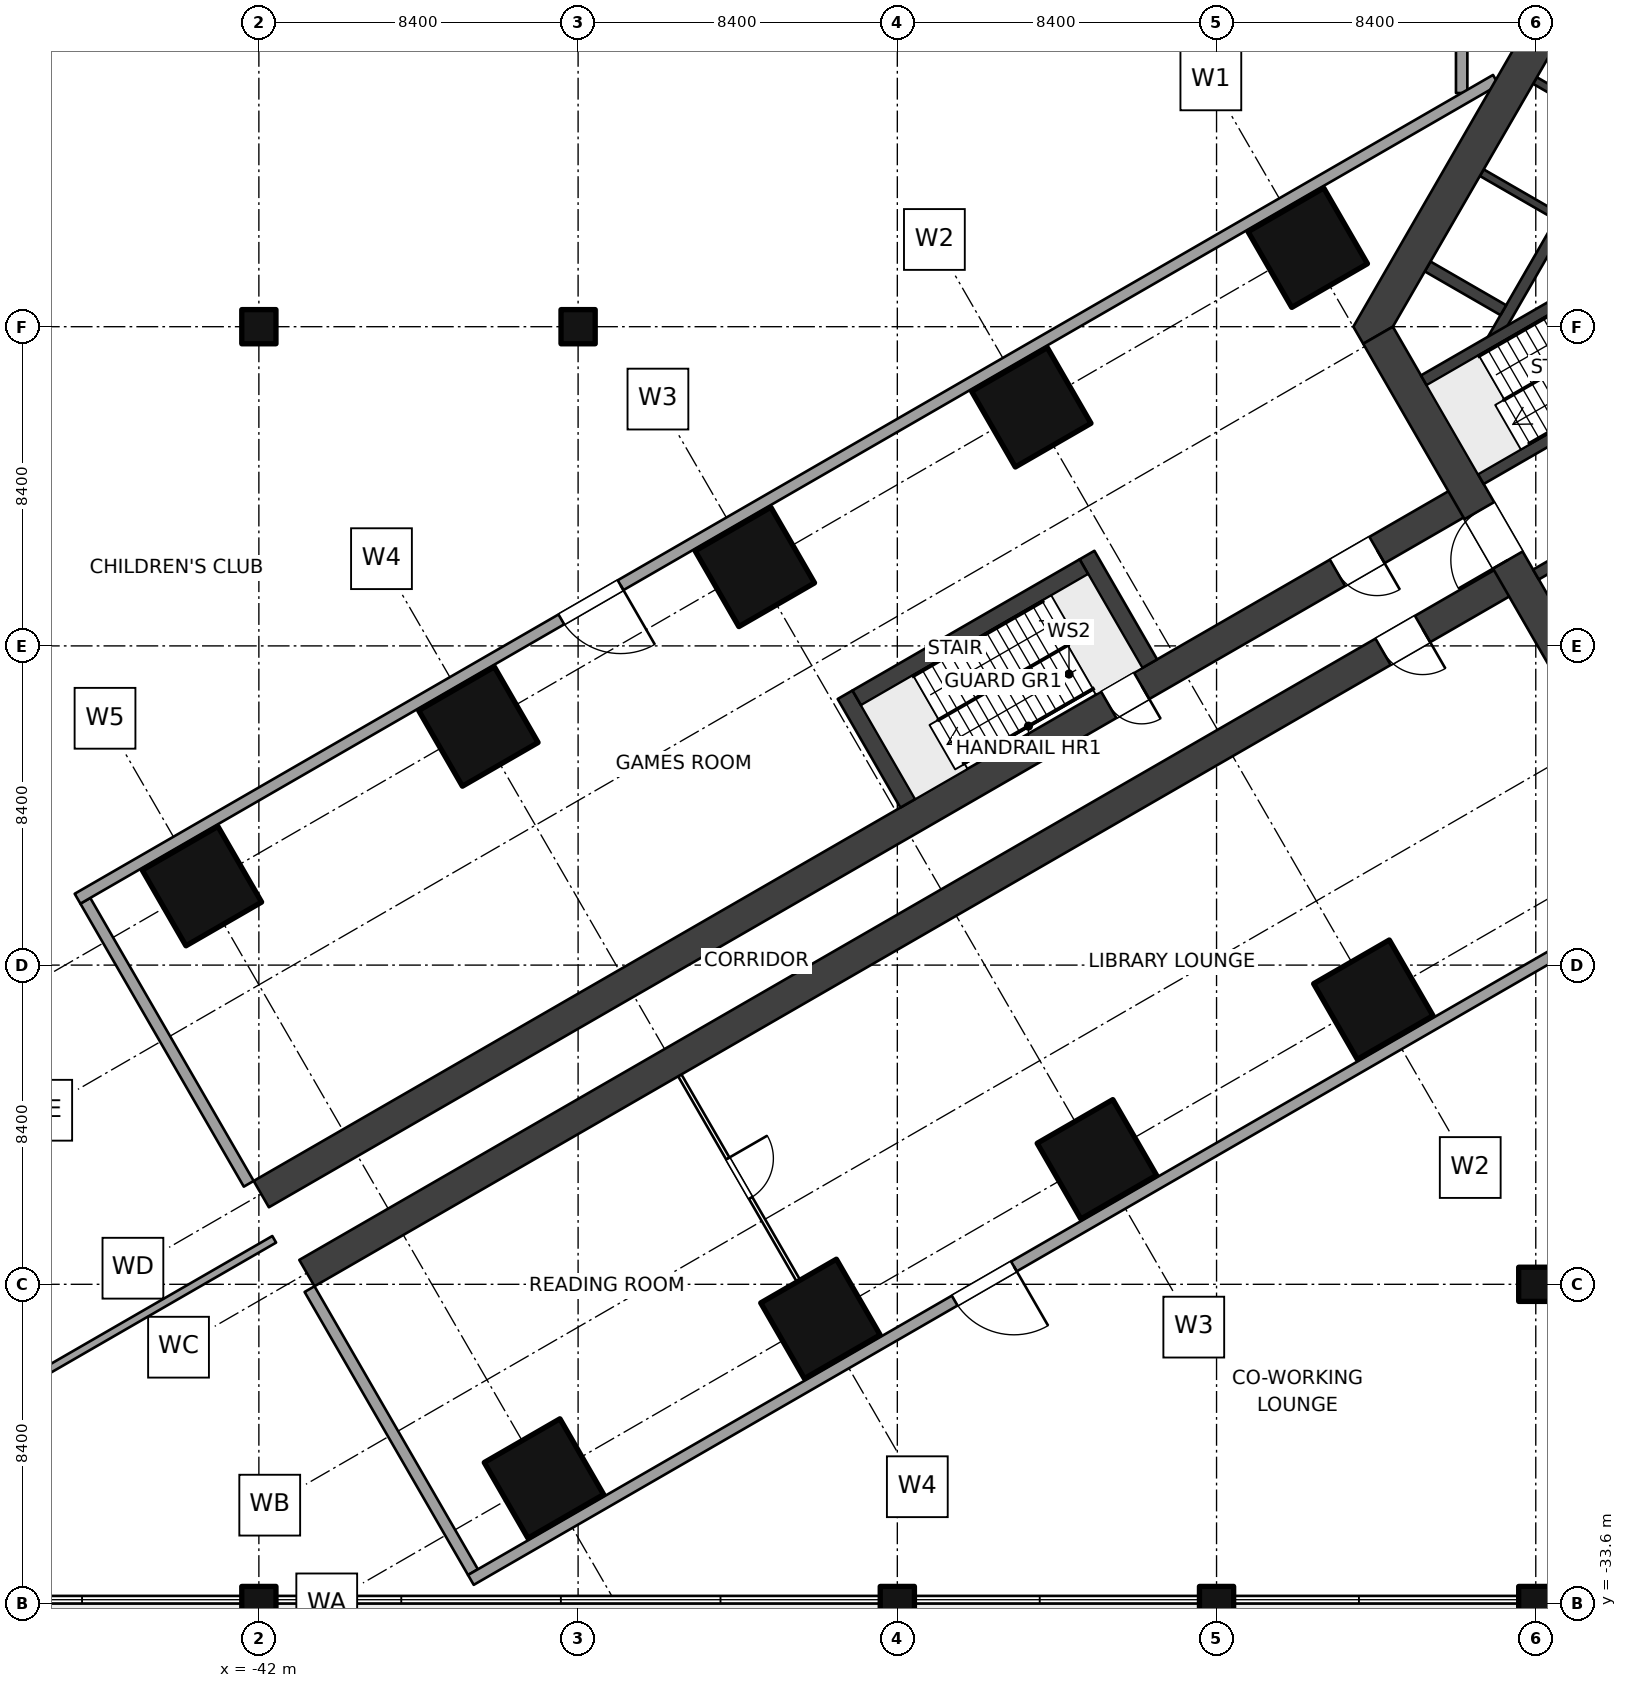
"""IFC4 building model, lengths in metres.
Left out: names, types, materials, properties, quantities, classifications, styles, units other than length and angle.
Written with IfcOpenShell. Run it as: python <this file> out.ifc"""

import sys

from ifc_helpers import new_model, si_unit, direction, frame, frame_2d, origin, origin_2d, place, context, subcontext, project, spatial, polyline, rectangle, outline, extrude, element, fill, save


model = new_model("IFC4")
c1 = context("Model", 3, precision=1e-05, world=origin(), true_north=direction((0.0, 1.0)))
c2 = subcontext(c1, "Body", "Model", "MODEL_VIEW")
j1 = project(units=[si_unit("LENGTHUNIT", "METRE"), si_unit("PLANEANGLEUNIT", "RADIAN")], contexts=[c1])
p1 = place(None, origin())
s1 = spatial("IfcSite", under=j1, at=p1, CompositionType="ELEMENT")
p2 = place(p1, origin())
s2 = spatial("IfcBuilding", under=s1, at=p2, CompositionType="ELEMENT")
p3 = place(p2, frame((0.0, 0.0, 6.0)))
s3 = spatial("IfcBuildingStorey", under=s2, at=p3, CompositionType="ELEMENT", Elevation=6.0)
for number, where, z_axis, x_axis in (
    (1, (-14.4, 2.078, 0.0), (0.0, 0.0, 1.0), (-0.5, 0.866, 0.0)),
    (2, (-12.675, -17.71, 0.0), (0.0, 0.0, 1.0), (-0.5, 0.866, 0.0)),
    (3, (-21.675, -2.122, 0.0), (0.0, 0.0, 1.0), (-0.5, 0.866, 0.0)),
    (4, (-19.949, -21.91, 0.0), (0.0, 0.0, 1.0), (-0.5, 0.866, 0.0)),
    (5, (-28.949, -6.322, 0.0), (0.0, 0.0, 1.0), (-0.5, 0.866, 0.0)),
    (6, (-27.224, -26.11, 0.0), (0.0, 0.0, 1.0), (-0.5, 0.866, 0.0)),
    (7, (-36.224, -10.521, 0.0), (0.0, 0.0, 1.0), (-0.5, 0.866, 0.0)),
    (8, (-34.499, -30.31, 0.0), (0.0, 0.0, 1.0), (-0.5, 0.866, 0.0)),
    (9, (-43.499, -14.721, 0.0), (0.0, 0.0, 1.0), (-0.5, 0.866, 0.0)),
):
    element("IfcColumn", number, at=place(p3, frame(where, z_axis=z_axis, x_axis=x_axis)), inside=s3, PredefinedType="COLUMN", context=c2, shape_type="SweptSolid", body=[
        extrude(rectangle(XDim=2.3, YDim=2.3, at=origin_2d()), origin(), (0.0, 0.0, 1.0), 5.0),
    ])
for number, where, z_axis, x_axis in (
    (10, (-42.0, -33.6, 0.0), (0.0, 0.0, 1.0), (1.0, 0.0, 0.0)),
    (11, (-42.0, 0.0, 0.0), (0.0, 0.0, 1.0), (1.0, 0.0, 0.0)),
    (12, (-33.6, 0.0, 0.0), (0.0, 0.0, 1.0), (1.0, 0.0, 0.0)),
    (13, (-25.2, -33.6, 0.0), (0.0, 0.0, 1.0), (1.0, 0.0, 0.0)),
    (14, (-16.8, -33.6, 0.0), (0.0, 0.0, 1.0), (1.0, 0.0, 0.0)),
    (15, (-8.4, -33.6, 0.0), (0.0, 0.0, 1.0), (1.0, 0.0, 0.0)),
    (16, (-8.4, -25.2, 0.0), (0.0, 0.0, 1.0), (1.0, 0.0, 0.0)),
):
    element("IfcColumn", number, at=place(p3, frame(where, z_axis=z_axis, x_axis=x_axis)), inside=s3, PredefinedType="COLUMN", context=c2, shape_type="SweptSolid", body=[
        extrude(rectangle(XDim=0.9, YDim=0.9, at=origin_2d()), origin(), (0.0, 0.0, 1.0), 5.0),
    ])
p4 = place(p3, frame((-6.47, -10.757, 0.0), z_axis=(0.0, 0.0, 1.0), x_axis=(-0.499997612506, 0.8660267822, 0.0)))
e17 = element("IfcWall", 17, at=p4, inside=s3, PredefinedType="SHEAR", context=c2, shape_type="SweptSolid", body=[
    extrude(rectangle(XDim=12.161, YDim=0.9, at=frame_2d((6.08, 0.0))), origin(), (0.0, 0.0, 1.0), 5.0),
])
p5 = place(p4, frame((5.33, 0.0, 0.0)))
e18 = element("IfcOpeningElement", 18, at=p5, cuts=e17, PredefinedType="OPENING", context=c2, shape_type="SweptSolid", body=[
    extrude(rectangle(XDim=1.5, YDim=2.1, at=frame_2d((0.75, 1.05))), frame((0.0, 0.46, 0.0), z_axis=(0.0, -1.0, 0.0), x_axis=(1.0, 0.0, 0.0)), (0.0, 0.0, 1.0), 0.92),
])
p6 = place(p3, origin())
e19 = element("IfcWall", 19, at=p6, inside=s3, PredefinedType="SHEAR", context=c2, shape_type="SweptSolid", body=[
    extrude(outline(polyline([(-6.6, 11.432), (-13.2, 0.0), (-12.94, -0.45), (-12.161, 0.0), (-6.08, 10.531), (-6.08, 11.432), (-6.6, 11.432)])), origin(), (0.0, 0.0, 1.0), 5.0),
])
p7 = place(p3, frame((-3.869, -0.559, 0.0), z_axis=(0.0, 0.0, 1.0), x_axis=(-0.86602711848, -0.499997030048, 0.0)))
e20 = element("IfcWall", 20, at=p7, inside=s3, PredefinedType="SHEAR", context=c2, shape_type="SweptSolid", body=[
    extrude(rectangle(XDim=6.901, YDim=0.3, at=frame_2d((3.451, 0.0))), origin(), (0.0, 0.0, 1.0), 5.0),
])
p8 = place(p7, frame((0.25, 0.0, 0.0)))
e21 = element("IfcOpeningElement", 21, at=p8, cuts=e20, PredefinedType="OPENING", context=c2, shape_type="SweptSolid", body=[
    extrude(rectangle(XDim=1.0, YDim=2.1, at=frame_2d((0.5, 1.05))), frame((0.0, 0.16, 0.0), z_axis=(0.0, -1.0, 0.0), x_axis=(1.0, 0.0, 0.0)), (0.0, 0.0, 1.0), 0.32),
])
p9 = place(p3, frame((-5.369, 2.039, 0.0), z_axis=(0.0, 0.0, 1.0), x_axis=(-0.86602711848, -0.499997030048, 0.0)))
e22 = element("IfcWall", 22, at=p9, inside=s3, PredefinedType="SHEAR", context=c2, shape_type="SweptSolid", body=[
    extrude(rectangle(XDim=6.901, YDim=0.3, at=frame_2d((3.451, 0.0))), origin(), (0.0, 0.0, 1.0), 5.0),
])
p10 = place(p3, frame((-2.419, -3.071, 0.0), z_axis=(0.0, 0.0, 1.0), x_axis=(-0.86602711848, -0.499997030048, 0.0)))
e23 = element("IfcWall", 23, at=p10, inside=s3, PredefinedType="SHEAR", context=c2, shape_type="SweptSolid", body=[
    extrude(rectangle(XDim=6.901, YDim=0.3, at=frame_2d((3.451, 0.0))), origin(), (0.0, 0.0, 1.0), 5.0),
])
p11 = place(p10, frame((4.85, 0.0, 0.0)))
e24 = element("IfcOpeningElement", 24, at=p11, cuts=e23, PredefinedType="OPENING", context=c2, shape_type="SweptSolid", body=[
    extrude(rectangle(XDim=1.1, YDim=2.1, at=frame_2d((0.55, 1.05))), frame((0.0, 0.16, 0.0), z_axis=(0.0, -1.0, 0.0), x_axis=(1.0, 0.0, 0.0)), (0.0, 0.0, 1.0), 0.32),
])
p12 = place(p3, frame((-9.548, -0.374, 0.0), z_axis=(0.0, 0.0, 1.0), x_axis=(0.500002290144, 0.866024081565, 0.0)))
e25 = element("IfcWall", 25, at=p12, inside=s3, PredefinedType="SHEAR", context=c2, shape_type="SweptSolid", body=[
    extrude(rectangle(XDim=10.195, YDim=0.3, at=frame_2d((5.098, 0.0))), origin(), (0.0, 0.0, 1.0), 5.0),
])
p13 = place(p3, frame((-9.254, 0.435, 0.0), z_axis=(0.0, 0.0, 1.0), x_axis=(-0.866007057882, 0.500031774688, 0.0)))
e26 = element("IfcWall", 26, at=p13, inside=s3, PredefinedType="SHEAR", context=c2, shape_type="SweptSolid", body=[
    extrude(rectangle(XDim=2.3, YDim=0.3, at=frame_2d((1.15, 0.0))), origin(), (0.0, 0.0, 1.0), 5.0),
])
for number, where, z_axis, x_axis in (
    (27, (-7.829, 2.903, 0.0), (0.0, 0.0, 1.0), (-0.866, 0.5, 0.0)),
    (28, (-6.429, 5.328, 0.0), (0.0, 0.0, 1.0), (-0.866, 0.5, 0.0)),
):
    element("IfcWall", number, at=place(p3, frame(where, z_axis=z_axis, x_axis=x_axis)), inside=s3, PredefinedType="SHEAR", context=c2, shape_type="SweptSolid", body=[
        extrude(rectangle(XDim=2.3, YDim=0.2, at=frame_2d((1.15, 0.0))), origin(), (0.0, 0.0, 1.0), 5.0),
    ])
p14 = place(p3, frame((-8.91, -6.53, 0.0), z_axis=(0.0, 0.0, 1.0), x_axis=(-0.866025284237, -0.500000207062, 0.0)))
e29 = element("IfcWall", 29, at=p14, inside=s3, PredefinedType="SHEAR", context=c2, shape_type="SweptSolid", body=[
    extrude(rectangle(XDim=36.75, YDim=0.8, at=frame_2d((18.375, 0.0))), origin(), (0.0, 0.0, 1.0), 5.0),
])
p15 = place(p14, frame((2.85, 0.0, 0.0)))
e30 = element("IfcOpeningElement", 30, at=p15, cuts=e29, PredefinedType="OPENING", context=c2, shape_type="SweptSolid", body=[
    extrude(rectangle(XDim=1.2, YDim=2.1, at=frame_2d((0.6, 1.05))), frame((0.0, 0.41, 0.0), z_axis=(0.0, -1.0, 0.0), x_axis=(1.0, 0.0, 0.0)), (0.0, 0.0, 1.0), 0.82),
])
p16 = place(p3, frame((-10.11, -4.451, 0.0), z_axis=(0.0, 0.0, 1.0), x_axis=(-0.866025284237, -0.500000207062, 0.0)))
e31 = element("IfcWall", 31, at=p16, inside=s3, PredefinedType="SHEAR", context=c2, shape_type="SweptSolid", body=[
    extrude(rectangle(XDim=36.75, YDim=0.8, at=frame_2d((18.375, 0.0))), origin(), (0.0, 0.0, 1.0), 5.0),
])
p17 = place(p16, frame((10.0, 0.0, 0.0)))
e32 = element("IfcOpeningElement", 32, at=p17, cuts=e31, PredefinedType="OPENING", context=c2, shape_type="SweptSolid", body=[
    extrude(rectangle(XDim=1.0, YDim=2.1, at=frame_2d((0.5, 1.05))), frame((0.0, 0.41, 0.0), z_axis=(0.0, -1.0, 0.0), x_axis=(1.0, 0.0, 0.0)), (0.0, 0.0, 1.0), 0.82),
])
p18 = place(p16, frame((2.85, 0.0, 0.0)))
e33 = element("IfcOpeningElement", 33, at=p18, cuts=e31, PredefinedType="OPENING", context=c2, shape_type="SweptSolid", body=[
    extrude(rectangle(XDim=1.2, YDim=2.1, at=frame_2d((0.6, 1.05))), frame((0.0, 0.41, 0.0), z_axis=(0.0, -1.0, 0.0), x_axis=(1.0, 0.0, 0.0)), (0.0, 0.0, 1.0), 0.82),
])
p19 = place(p3, frame((-30.924, -19.701, 0.0), z_axis=(0.0, 0.0, 1.0), x_axis=(0.500004234368, -0.866022959057, 0.0)))
e34 = element("IfcWall", 34, at=p19, inside=s3, PredefinedType="PARTITIONING", context=c2, shape_type="SweptSolid", body=[
    extrude(rectangle(XDim=6.25, YDim=0.1, at=frame_2d((3.125, 0.0))), origin(), (0.0, 0.0, 1.0), 2.9),
])
p20 = place(p19, frame((2.525, 0.0, 0.0)))
e35 = element("IfcOpeningElement", 35, at=p20, cuts=e34, PredefinedType="OPENING", context=c2, shape_type="SweptSolid", body=[
    extrude(rectangle(XDim=1.2, YDim=2.1, at=frame_2d((0.6, 1.05))), frame((0.0, 0.06, 0.0), z_axis=(0.0, -1.0, 0.0), x_axis=(1.0, 0.0, 0.0)), (0.0, 0.0, 1.0), 0.12),
])
p21 = place(p3, frame((-41.596, -24.016, 0.0), z_axis=(0.0, 0.0, 1.0), x_axis=(-0.866027790195, -0.499995866593, 0.0)))
e36 = element("IfcWall", 36, at=p21, inside=s3, PredefinedType="SOLIDWALL", context=c2, shape_type="SweptSolid", body=[
    extrude(rectangle(XDim=9.919, YDim=0.2, at=frame_2d((4.96, 0.0))), origin(), (0.0, 0.0, 1.0), 4.7),
])
for number, where, z_axis, x_axis in (
    (37, (-40.667, -25.326, 0.0), (0.0, 0.0, 1.0), (0.5, -0.866, 0.0)),
    (38, (-42.267, -22.555, 0.0), (0.0, 0.0, 1.0), (-0.5, 0.866, 0.0)),
):
    element("IfcWall", number, at=place(p3, frame(where, z_axis=z_axis, x_axis=x_axis)), inside=s3, PredefinedType="SOLIDWALL", context=c2, shape_type="SweptSolid", body=[
        extrude(rectangle(XDim=8.6, YDim=0.3, at=frame_2d((4.3, 0.0))), origin(), (0.0, 0.0, 1.0), 3.1),
    ])
p22 = place(p3, frame((-10.35, 6.149, 0.0), z_axis=(0.0, 0.0, 1.0), x_axis=(0.0, 1.0, 0.0)))
e39 = element("IfcWall", 39, at=p22, inside=s3, PredefinedType="SOLIDWALL", context=c2, shape_type="SweptSolid", body=[
    extrude(rectangle(XDim=41.883, YDim=0.3, at=frame_2d((20.941, 0.0))), origin(), (0.0, 0.0, 1.0), 4.7),
])
p23 = place(p22, frame((25.383, 0.0, 0.0)))
e40 = element("IfcOpeningElement", 40, at=p23, cuts=e39, PredefinedType="OPENING", context=c2, shape_type="SweptSolid", body=[
    extrude(rectangle(XDim=1.8, YDim=2.4, at=frame_2d((0.9, 1.2))), frame((0.0, 0.16, 0.0), z_axis=(0.0, -1.0, 0.0), x_axis=(1.0, 0.0, 0.0)), (0.0, 0.0, 1.0), 0.32),
])
p24 = place(p3, frame((-0.15, -12.038, 0.0), z_axis=(0.0, 0.0, 1.0), x_axis=(-0.866026292622, -0.499998460486, 0.0)))
e41 = element("IfcWall", 41, at=p24, inside=s3, PredefinedType="SOLIDWALL", context=c2, shape_type="SweptSolid", body=[
    extrude(rectangle(XDim=41.883, YDim=0.3, at=frame_2d((20.941, 0.0))), origin(), (0.0, 0.0, 1.0), 4.7),
])
p25 = place(p24, frame((25.383, 0.0, 0.0)))
e42 = element("IfcOpeningElement", 42, at=p25, cuts=e41, PredefinedType="OPENING", context=c2, shape_type="SweptSolid", body=[
    extrude(rectangle(XDim=1.8, YDim=2.4, at=frame_2d((0.9, 1.2))), frame((0.0, 0.16, 0.0), z_axis=(0.0, -1.0, 0.0), x_axis=(1.0, 0.0, 0.0)), (0.0, 0.0, 1.0), 0.32),
])
p26 = place(p3, frame((-9.45, 6.495, 0.0), z_axis=(0.0, 0.0, 1.0), x_axis=(-0.866025301493, -0.500000177174, 0.0)))
e43 = element("IfcWall", 43, at=p26, inside=s3, PredefinedType="SOLIDWALL", context=c2, shape_type="SweptSolid", body=[
    extrude(rectangle(XDim=43.095, YDim=0.3, at=frame_2d((21.548, 0.0))), origin(), (0.0, 0.0, 1.0), 4.7),
])
p27 = place(p26, frame((26.595, 0.0, 0.0)))
e44 = element("IfcOpeningElement", 44, at=p27, cuts=e43, PredefinedType="OPENING", context=c2, shape_type="SweptSolid", body=[
    extrude(rectangle(XDim=1.8, YDim=2.4, at=frame_2d((0.9, 1.2))), frame((0.0, 0.16, 0.0), z_axis=(0.0, -1.0, 0.0), x_axis=(1.0, 0.0, 0.0)), (0.0, 0.0, 1.0), 0.32),
])
for number, where, z_axis, x_axis in (
    (45, (-18.559, -8.868, 0.0), (0.0, 0.0, 1.0), (-0.5, 0.866, 0.0)),
    (46, (-24.925, -12.543, 0.0), (0.0, 0.0, 1.0), (-0.5, 0.866, 0.0)),
):
    element("IfcWall", number, at=place(p3, frame(where, z_axis=z_axis, x_axis=x_axis)), inside=s3, PredefinedType="SOLIDWALL", context=c2, shape_type="SweptSolid", body=[
        extrude(rectangle(XDim=3.3, YDim=0.45, at=frame_2d((1.65, 0.0))), origin(), (0.0, 0.0, 1.0), 5.0),
    ])
p28 = place(p3, frame((-20.292, -6.317, 0.0), z_axis=(0.0, 0.0, 1.0), x_axis=(-0.866028853923, -0.499994024137, 0.0)))
e47 = element("IfcWall", 47, at=p28, inside=s3, PredefinedType="SOLIDWALL", context=c2, shape_type="SweptSolid", body=[
    extrude(rectangle(XDim=6.9, YDim=0.45, at=frame_2d((3.45, 0.0))), origin(), (0.0, 0.0, 1.0), 5.0),
])
p29 = place(p5, origin())
e48 = element("IfcDoor", 48, at=p29, inside=s3, OperationType="DOUBLE_DOOR_DOUBLE_SWING", PredefinedType="DOOR", context=c2, shape_type="SweptSolid", body=[
    extrude(rectangle(XDim=1.5, YDim=2.1, at=frame_2d((0.75, 1.05))), frame((0.0, 0.025, 0.0), z_axis=(0.0, -1.0, 0.0), x_axis=(1.0, 0.0, 0.0)), (0.0, 0.0, 1.0), 0.05),
])
fill(e18, e48)
p30 = place(p17, origin())
e49 = element("IfcDoor", 49, at=p30, inside=s3, OperationType="SINGLE_SWING_LEFT", PredefinedType="DOOR", context=c2, shape_type="SweptSolid", body=[
    extrude(rectangle(XDim=1.0, YDim=2.1, at=frame_2d((0.5, 1.05))), frame((0.0, 0.025, 0.0), z_axis=(0.0, -1.0, 0.0), x_axis=(1.0, 0.0, 0.0)), (0.0, 0.0, 1.0), 0.05),
])
fill(e32, e49)
p31 = place(p20, origin())
e50 = element("IfcDoor", 50, at=p31, inside=s3, OperationType="DOUBLE_SWING_LEFT", PredefinedType="DOOR", context=c2, shape_type="SweptSolid", body=[
    extrude(rectangle(XDim=1.2, YDim=2.1, at=frame_2d((0.6, 1.05))), frame((0.0, 0.025, 0.0), z_axis=(0.0, -1.0, 0.0), x_axis=(1.0, 0.0, 0.0)), (0.0, 0.0, 1.0), 0.05),
])
fill(e35, e50)
p32 = place(p15, origin())
e51 = element("IfcDoor", 51, at=p32, inside=s3, OperationType="DOUBLE_SWING_LEFT", PredefinedType="DOOR", context=c2, shape_type="SweptSolid", body=[
    extrude(rectangle(XDim=1.2, YDim=2.1, at=frame_2d((0.6, 1.05))), frame((0.0, 0.025, 0.0), z_axis=(0.0, -1.0, 0.0), x_axis=(1.0, 0.0, 0.0)), (0.0, 0.0, 1.0), 0.05),
])
fill(e30, e51)
p33 = place(p18, origin())
e52 = element("IfcDoor", 52, at=p33, inside=s3, OperationType="DOUBLE_SWING_LEFT", PredefinedType="DOOR", context=c2, shape_type="SweptSolid", body=[
    extrude(rectangle(XDim=1.2, YDim=2.1, at=frame_2d((0.6, 1.05))), frame((0.0, 0.025, 0.0), z_axis=(0.0, -1.0, 0.0), x_axis=(1.0, 0.0, 0.0)), (0.0, 0.0, 1.0), 0.05),
])
fill(e33, e52)
p34 = place(p25, origin())
e53 = element("IfcDoor", 53, at=p34, inside=s3, OperationType="DOUBLE_DOOR_DOUBLE_SWING", PredefinedType="DOOR", context=c2, shape_type="SweptSolid", body=[
    extrude(rectangle(XDim=1.8, YDim=2.4, at=frame_2d((0.9, 1.2))), frame((0.0, 0.025, 0.0), z_axis=(0.0, -1.0, 0.0), x_axis=(1.0, 0.0, 0.0)), (0.0, 0.0, 1.0), 0.05),
])
fill(e42, e53)
p35 = place(p27, origin())
e54 = element("IfcDoor", 54, at=p35, inside=s3, OperationType="DOUBLE_DOOR_DOUBLE_SWING", PredefinedType="DOOR", context=c2, shape_type="SweptSolid", body=[
    extrude(rectangle(XDim=1.8, YDim=2.4, at=frame_2d((0.9, 1.2))), frame((0.0, 0.025, 0.0), z_axis=(0.0, -1.0, 0.0), x_axis=(1.0, 0.0, 0.0)), (0.0, 0.0, 1.0), 0.05),
])
fill(e44, e54)
save(model, sys.argv[1])
